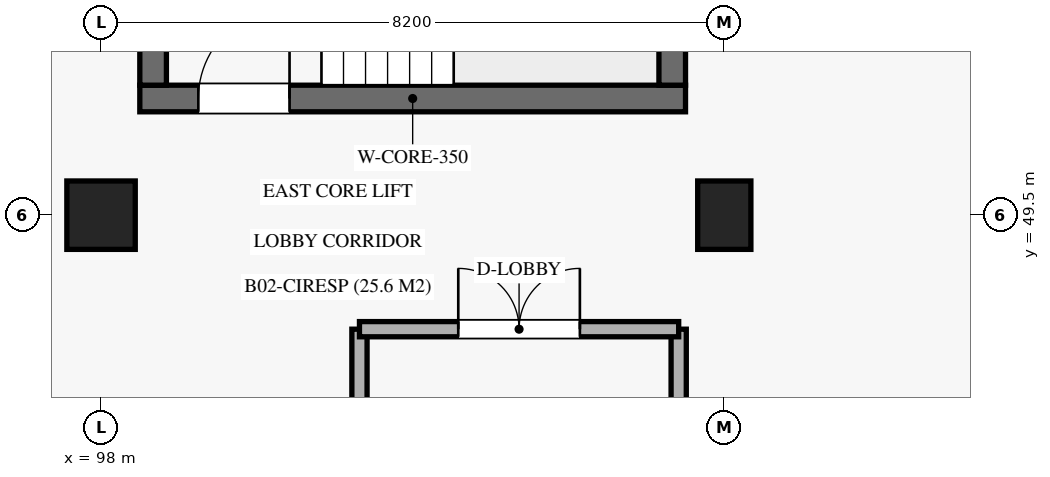
"""IFC4 building model, lengths in metres.
Left out: names, types, materials, properties, quantities, classifications, styles, units other than length and angle.
Written with IfcOpenShell. Run it as: python <this file> out.ifc"""

import sys

from ifc_helpers import new_model, si_unit, direction, frame, frame_2d, origin, origin_2d, place, context, subcontext, project, spatial, rectangle, extrude, element, fill, save


model = new_model("IFC4")
c1 = context("Model", 3, precision=1e-05, world=origin(), true_north=direction((0.0, 1.0)))
c2 = subcontext(c1, "Body", "Model", "MODEL_VIEW")
j1 = project(units=[si_unit("LENGTHUNIT", "METRE"), si_unit("PLANEANGLEUNIT", "RADIAN")], contexts=[c1])
p1 = place(None, origin())
s1 = spatial("IfcSite", under=j1, at=p1, CompositionType="ELEMENT")
p2 = place(p1, origin())
s2 = spatial("IfcBuilding", under=s1, at=p2, CompositionType="ELEMENT")
p3 = place(p2, frame((0.0, 0.0, -9.18)))
s3 = spatial("IfcBuildingStorey", under=s2, at=p3, CompositionType="ELEMENT", Elevation=-9.18)
p4 = place(p3, frame((98.0, 49.5, 0.0), z_axis=(0.0, 0.0, 1.0), x_axis=(1.0, 0.0, 0.0)))
e1 = element("IfcColumn", 1, at=p4, inside=s3, PredefinedType="COLUMN", context=c2, shape_type="SweptSolid", body=[
    extrude(rectangle(XDim=0.9, YDim=0.9, at=origin_2d()), origin(), (0.0, 0.0, 1.0), 4.59),
])
p5 = place(p3, frame((106.2, 49.5, 0.0), z_axis=(0.0, 0.0, 1.0), x_axis=(1.0, 0.0, 0.0)))
e2 = element("IfcColumn", 2, at=p5, inside=s3, PredefinedType="COLUMN", context=c2, shape_type="SweptSolid", body=[
    extrude(rectangle(XDim=0.7, YDim=0.9, at=origin_2d()), origin(), (0.0, 0.0, 1.0), 4.59),
])
p6 = place(p3, frame((98.51, 51.035, 0.0), z_axis=(0.0, 0.0, 1.0), x_axis=(1.0, 0.0, 0.0)))
e3 = element("IfcWall", 3, at=p6, inside=s3, PredefinedType="SHEAR", context=c2, shape_type="SweptSolid", body=[
    extrude(rectangle(XDim=7.18, YDim=0.35, at=frame_2d((3.59, 0.0))), origin(), (0.0, 0.0, 1.0), 4.31),
])
p7 = place(p6, frame((0.77, 0.0, 0.0)))
e4 = element("IfcOpeningElement", 4, at=p7, cuts=e3, PredefinedType="OPENING", context=c2, shape_type="SweptSolid", body=[
    extrude(rectangle(XDim=1.2, YDim=2.2, at=frame_2d((0.6, 1.1))), frame((0.0, 0.185, 0.0), z_axis=(0.0, -1.0, 0.0), x_axis=(1.0, 0.0, 0.0)), (0.0, 0.0, 1.0), 0.37),
])
for number, where, z_axis, x_axis in (
    (5, (98.685, 51.21, 0.0), (0.0, 0.0, 1.0), (0.0, 1.0, 0.0)),
    (6, (105.515, 51.21, 0.0), (0.0, 0.0, 1.0), (0.0, 1.0, 0.0)),
):
    element("IfcWall", number, at=place(p3, frame(where, z_axis=z_axis, x_axis=x_axis)), inside=s3, PredefinedType="SHEAR", context=c2, shape_type="SweptSolid", body=[
        extrude(rectangle(XDim=6.48, YDim=0.35, at=frame_2d((3.24, 0.0))), origin(), (0.0, 0.0, 1.0), 4.31),
    ])
p8 = place(p3, frame((101.4, 45.6, 0.0), z_axis=(0.0, 0.0, 1.0), x_axis=(0.0, 1.0, 0.0)))
e7 = element("IfcWall", 7, at=p8, inside=s3, PredefinedType="SOLIDWALL", context=c2, shape_type="SweptSolid", body=[
    extrude(rectangle(XDim=2.4, YDim=0.2, at=frame_2d((1.2, 0.0))), origin(), (0.0, 0.0, 1.0), 3.43),
])
p9 = place(p3, frame((105.6, 40.3, 0.0), z_axis=(0.0, 0.0, 1.0), x_axis=(0.0, 1.0, 0.0)))
e8 = element("IfcWall", 8, at=p9, inside=s3, PredefinedType="SOLIDWALL", context=c2, shape_type="SweptSolid", body=[
    extrude(rectangle(XDim=7.7, YDim=0.2, at=frame_2d((3.85, 0.0))), origin(), (0.0, 0.0, 1.0), 3.43),
])
p10 = place(p3, frame((101.4, 48.0, 0.0), z_axis=(0.0, 0.0, 1.0), x_axis=(1.0, 0.0, 0.0)))
e9 = element("IfcWall", 9, at=p10, inside=s3, PredefinedType="SOLIDWALL", context=c2, shape_type="SweptSolid", body=[
    extrude(rectangle(XDim=4.2, YDim=0.2, at=frame_2d((2.1, 0.0))), origin(), (0.0, 0.0, 1.0), 3.43),
])
p11 = place(p10, frame((1.3, 0.0, 0.0)))
e10 = element("IfcOpeningElement", 10, at=p11, cuts=e9, PredefinedType="OPENING", context=c2, shape_type="SweptSolid", body=[
    extrude(rectangle(XDim=1.6, YDim=2.2, at=frame_2d((0.8, 1.1))), frame((0.0, 0.11, 0.0), z_axis=(0.0, -1.0, 0.0), x_axis=(1.0, 0.0, 0.0)), (0.0, 0.0, 1.0), 0.22),
])
p12 = place(p7, origin())
e11 = element("IfcDoor", 11, at=p12, inside=s3, OperationType="SINGLE_SWING_RIGHT", PredefinedType="DOOR", context=c2, shape_type="SweptSolid", body=[
    extrude(rectangle(XDim=1.2, YDim=2.2, at=frame_2d((0.6, 1.1))), frame((0.0, 0.025, 0.0), z_axis=(0.0, -1.0, 0.0), x_axis=(1.0, 0.0, 0.0)), (0.0, 0.0, 1.0), 0.05),
])
fill(e4, e11)
p13 = place(p11, origin())
e12 = element("IfcDoor", 12, at=p13, inside=s3, OperationType="DOUBLE_DOOR_SINGLE_SWING", PredefinedType="DOOR", context=c2, shape_type="SweptSolid", body=[
    extrude(rectangle(XDim=1.6, YDim=2.2, at=frame_2d((0.8, 1.1))), frame((0.0, 0.025, 0.0), z_axis=(0.0, -1.0, 0.0), x_axis=(1.0, 0.0, 0.0)), (0.0, 0.0, 1.0), 0.05),
])
fill(e10, e12)
save(model, sys.argv[1])
